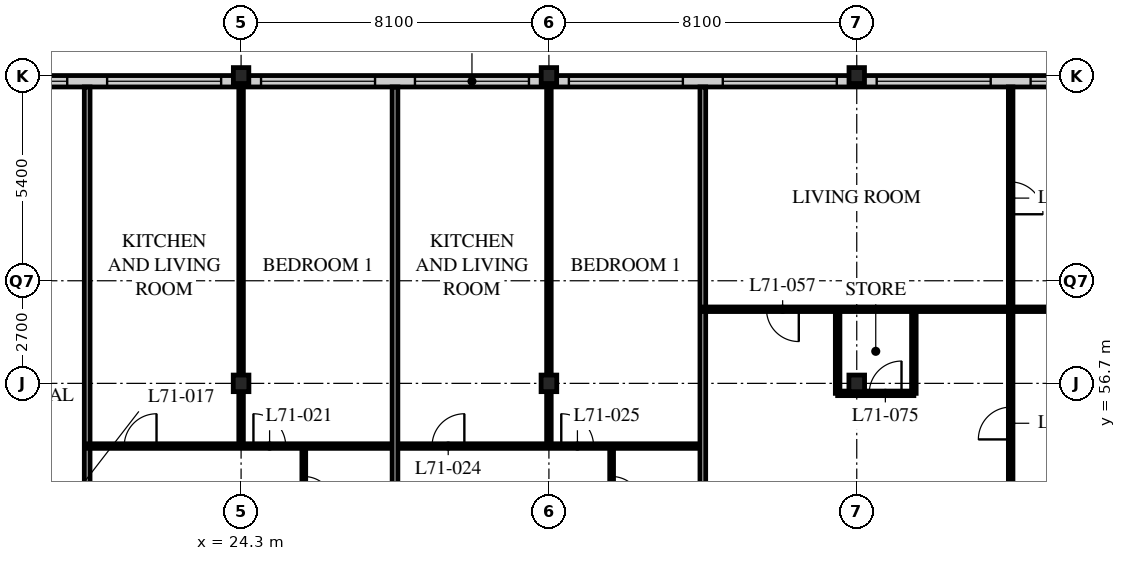
"""IFC4 building model, lengths in metres.
Left out: names, types, materials, properties, quantities, classifications, styles, units other than length and angle.
Written with IfcOpenShell. Run it as: python <this file> out.ifc"""

import sys

from ifc_helpers import new_model, si_unit, direction, frame, frame_2d, origin, origin_2d, place, context, subcontext, project, spatial, rectangle, i_section, extrude, element, fill, save


model = new_model("IFC4")
c1 = context("Model", 3, precision=1e-05, world=origin(), true_north=direction((0.0, 1.0)))
c2 = subcontext(c1, "Body", "Model", "MODEL_VIEW")
j1 = project(units=[si_unit("LENGTHUNIT", "METRE"), si_unit("PLANEANGLEUNIT", "RADIAN")], contexts=[c1])
p1 = place(None, origin())
s1 = spatial("IfcSite", under=j1, at=p1, CompositionType="ELEMENT")
p2 = place(p1, origin())
s2 = spatial("IfcBuilding", under=s1, at=p2, CompositionType="ELEMENT")
p3 = place(p2, frame((0.0, 0.0, 277.5)))
s3 = spatial("IfcBuildingStorey", under=s2, at=p3, CompositionType="ELEMENT", Elevation=277.5)
p4 = place(p3, frame((24.3, 56.7, 0.0), z_axis=(0.0, 0.0, 1.0), x_axis=(1.0, 0.0, 0.0)))
e1 = element("IfcColumn", 1, at=p4, inside=s3, PredefinedType="COLUMN", context=c2, shape_type="SweptSolid", body=[
    extrude(i_section(OverallWidth=0.412, OverallDepth=0.437, WebThickness=0.036, FlangeThickness=0.058, FilletRadius=0.015, at=origin_2d()), origin(), (0.0, 0.0, 1.0), 3.9),
])
p5 = place(p3, frame((24.3, 64.8, 0.0), z_axis=(0.0, 0.0, 1.0), x_axis=(1.0, 0.0, 0.0)))
e2 = element("IfcColumn", 2, at=p5, inside=s3, PredefinedType="COLUMN", context=c2, shape_type="SweptSolid", body=[
    extrude(i_section(OverallWidth=0.407, OverallDepth=0.419, WebThickness=0.031, FlangeThickness=0.049, FilletRadius=0.015, at=origin_2d()), origin(), (0.0, 0.0, 1.0), 3.9),
])
p6 = place(p3, frame((32.4, 56.7, 0.0), z_axis=(0.0, 0.0, 1.0), x_axis=(1.0, 0.0, 0.0)))
e3 = element("IfcColumn", 3, at=p6, inside=s3, PredefinedType="COLUMN", context=c2, shape_type="SweptSolid", body=[
    extrude(i_section(OverallWidth=0.412, OverallDepth=0.437, WebThickness=0.036, FlangeThickness=0.058, FilletRadius=0.015, at=origin_2d()), origin(), (0.0, 0.0, 1.0), 3.9),
])
p7 = place(p3, frame((32.4, 64.8, 0.0), z_axis=(0.0, 0.0, 1.0), x_axis=(1.0, 0.0, 0.0)))
e4 = element("IfcColumn", 4, at=p7, inside=s3, PredefinedType="COLUMN", context=c2, shape_type="SweptSolid", body=[
    extrude(i_section(OverallWidth=0.407, OverallDepth=0.419, WebThickness=0.031, FlangeThickness=0.049, FilletRadius=0.015, at=origin_2d()), origin(), (0.0, 0.0, 1.0), 3.9),
])
p8 = place(p3, frame((40.5, 56.7, 0.0), z_axis=(0.0, 0.0, 1.0), x_axis=(1.0, 0.0, 0.0)))
e5 = element("IfcColumn", 5, at=p8, inside=s3, PredefinedType="COLUMN", context=c2, shape_type="SweptSolid", body=[
    extrude(i_section(OverallWidth=0.412, OverallDepth=0.437, WebThickness=0.036, FlangeThickness=0.058, FilletRadius=0.015, at=origin_2d()), origin(), (0.0, 0.0, 1.0), 3.9),
])
p9 = place(p3, frame((40.5, 64.8, 0.0), z_axis=(0.0, 0.0, 1.0), x_axis=(1.0, 0.0, 0.0)))
e6 = element("IfcColumn", 6, at=p9, inside=s3, PredefinedType="COLUMN", context=c2, shape_type="SweptSolid", body=[
    extrude(i_section(OverallWidth=0.407, OverallDepth=0.419, WebThickness=0.031, FlangeThickness=0.049, FilletRadius=0.015, at=origin_2d()), origin(), (0.0, 0.0, 1.0), 3.9),
])
p10 = place(p3, frame((48.3, 64.65, 0.0), z_axis=(0.0, 0.0, 1.0), x_axis=(-1.0, 0.0, 0.0)))
e7 = element("IfcWall", 7, at=p10, inside=s3, PredefinedType="SOLIDWALL", context=c2, shape_type="SweptSolid", body=[
    extrude(rectangle(XDim=40.2, YDim=0.3, at=frame_2d((20.1, 0.0))), origin(), (0.0, 0.0, 1.0), 3.69),
])
p11 = place(p10, frame((0.225, 0.0, 0.6)))
e8 = element("IfcOpeningElement", 8, at=p11, cuts=e7, PredefinedType="OPENING", context=c2, shape_type="SweptSolid", body=[
    extrude(rectangle(XDim=3.0, YDim=2.4, at=frame_2d((1.5, 1.2))), frame((0.0, 0.16, 0.0), z_axis=(0.0, -1.0, 0.0), x_axis=(1.0, 0.0, 0.0)), (0.0, 0.0, 1.0), 0.32),
])
p12 = place(p10, frame((4.275, 0.0, 0.6)))
e9 = element("IfcOpeningElement", 9, at=p12, cuts=e7, PredefinedType="OPENING", context=c2, shape_type="SweptSolid", body=[
    extrude(rectangle(XDim=3.0, YDim=2.4, at=frame_2d((1.5, 1.2))), frame((0.0, 0.16, 0.0), z_axis=(0.0, -1.0, 0.0), x_axis=(1.0, 0.0, 0.0)), (0.0, 0.0, 1.0), 0.32),
])
p13 = place(p10, frame((8.325, 0.0, 0.6)))
e10 = element("IfcOpeningElement", 10, at=p13, cuts=e7, PredefinedType="OPENING", context=c2, shape_type="SweptSolid", body=[
    extrude(rectangle(XDim=3.0, YDim=2.4, at=frame_2d((1.5, 1.2))), frame((0.0, 0.16, 0.0), z_axis=(0.0, -1.0, 0.0), x_axis=(1.0, 0.0, 0.0)), (0.0, 0.0, 1.0), 0.32),
])
p14 = place(p10, frame((12.375, 0.0, 0.6)))
e11 = element("IfcOpeningElement", 11, at=p14, cuts=e7, PredefinedType="OPENING", context=c2, shape_type="SweptSolid", body=[
    extrude(rectangle(XDim=3.0, YDim=2.4, at=frame_2d((1.5, 1.2))), frame((0.0, 0.16, 0.0), z_axis=(0.0, -1.0, 0.0), x_axis=(1.0, 0.0, 0.0)), (0.0, 0.0, 1.0), 0.32),
])
p15 = place(p10, frame((16.425, 0.0, 0.6)))
e12 = element("IfcOpeningElement", 12, at=p15, cuts=e7, PredefinedType="OPENING", context=c2, shape_type="SweptSolid", body=[
    extrude(rectangle(XDim=3.0, YDim=2.4, at=frame_2d((1.5, 1.2))), frame((0.0, 0.16, 0.0), z_axis=(0.0, -1.0, 0.0), x_axis=(1.0, 0.0, 0.0)), (0.0, 0.0, 1.0), 0.32),
])
p16 = place(p10, frame((20.475, 0.0, 0.6)))
e13 = element("IfcOpeningElement", 13, at=p16, cuts=e7, PredefinedType="OPENING", context=c2, shape_type="SweptSolid", body=[
    extrude(rectangle(XDim=3.0, YDim=2.4, at=frame_2d((1.5, 1.2))), frame((0.0, 0.16, 0.0), z_axis=(0.0, -1.0, 0.0), x_axis=(1.0, 0.0, 0.0)), (0.0, 0.0, 1.0), 0.32),
])
p17 = place(p10, frame((24.525, 0.0, 0.6)))
e14 = element("IfcOpeningElement", 14, at=p17, cuts=e7, PredefinedType="OPENING", context=c2, shape_type="SweptSolid", body=[
    extrude(rectangle(XDim=3.0, YDim=2.4, at=frame_2d((1.5, 1.2))), frame((0.0, 0.16, 0.0), z_axis=(0.0, -1.0, 0.0), x_axis=(1.0, 0.0, 0.0)), (0.0, 0.0, 1.0), 0.32),
])
p18 = place(p10, frame((28.575, 0.0, 0.6)))
e15 = element("IfcOpeningElement", 15, at=p18, cuts=e7, PredefinedType="OPENING", context=c2, shape_type="SweptSolid", body=[
    extrude(rectangle(XDim=3.0, YDim=2.4, at=frame_2d((1.5, 1.2))), frame((0.0, 0.16, 0.0), z_axis=(0.0, -1.0, 0.0), x_axis=(1.0, 0.0, 0.0)), (0.0, 0.0, 1.0), 0.32),
])
p19 = place(p10, frame((32.625, 0.0, 0.6)))
e16 = element("IfcOpeningElement", 16, at=p19, cuts=e7, PredefinedType="OPENING", context=c2, shape_type="SweptSolid", body=[
    extrude(rectangle(XDim=3.0, YDim=2.4, at=frame_2d((1.5, 1.2))), frame((0.0, 0.16, 0.0), z_axis=(0.0, -1.0, 0.0), x_axis=(1.0, 0.0, 0.0)), (0.0, 0.0, 1.0), 0.32),
])
p20 = place(p10, frame((36.675, 0.0, 0.6)))
e17 = element("IfcOpeningElement", 17, at=p20, cuts=e7, PredefinedType="OPENING", context=c2, shape_type="SweptSolid", body=[
    extrude(rectangle(XDim=3.0, YDim=2.4, at=frame_2d((1.5, 1.2))), frame((0.0, 0.16, 0.0), z_axis=(0.0, -1.0, 0.0), x_axis=(1.0, 0.0, 0.0)), (0.0, 0.0, 1.0), 0.32),
])
p21 = place(p3, frame((20.25, 52.65, 0.0), z_axis=(0.0, 0.0, 1.0), x_axis=(0.0, 1.0, 0.0)))
e18 = element("IfcWall", 18, at=p21, inside=s3, PredefinedType="PARTITIONING", context=c2, shape_type="SweptSolid", body=[
    extrude(rectangle(XDim=11.85, YDim=0.15, at=frame_2d((5.925, 0.0))), origin(), (0.0, 0.0, 1.0), 3.69),
])
p22 = place(p3, frame((20.25, 55.05, 0.0), z_axis=(0.0, 0.0, 1.0), x_axis=(1.0, 0.0, 0.0)))
e19 = element("IfcWall", 19, at=p22, inside=s3, PredefinedType="PARTITIONING", context=c2, shape_type="SweptSolid", body=[
    extrude(rectangle(XDim=16.2, YDim=0.12, at=frame_2d((8.1, 0.0))), origin(), (0.0, 0.0, 1.0), 3.69),
])
p23 = place(p22, frame((0.975, 0.0, 0.0)))
e20 = element("IfcOpeningElement", 20, at=p23, cuts=e19, PredefinedType="OPENING", context=c2, shape_type="SweptSolid", body=[
    extrude(rectangle(XDim=0.85, YDim=2.1, at=frame_2d((0.425, 1.05))), frame((0.0, 0.07, 0.0), z_axis=(0.0, -1.0, 0.0), x_axis=(1.0, 0.0, 0.0)), (0.0, 0.0, 1.0), 0.14),
])
p24 = place(p22, frame((4.375, 0.0, 0.0)))
e21 = element("IfcOpeningElement", 21, at=p24, cuts=e19, PredefinedType="OPENING", context=c2, shape_type="SweptSolid", body=[
    extrude(rectangle(XDim=0.85, YDim=2.1, at=frame_2d((0.425, 1.05))), frame((0.0, 0.07, 0.0), z_axis=(0.0, -1.0, 0.0), x_axis=(1.0, 0.0, 0.0)), (0.0, 0.0, 1.0), 0.14),
])
p25 = place(p22, frame((9.075, 0.0, 0.0)))
e22 = element("IfcOpeningElement", 22, at=p25, cuts=e19, PredefinedType="OPENING", context=c2, shape_type="SweptSolid", body=[
    extrude(rectangle(XDim=0.85, YDim=2.1, at=frame_2d((0.425, 1.05))), frame((0.0, 0.07, 0.0), z_axis=(0.0, -1.0, 0.0), x_axis=(1.0, 0.0, 0.0)), (0.0, 0.0, 1.0), 0.14),
])
p26 = place(p22, frame((12.475, 0.0, 0.0)))
e23 = element("IfcOpeningElement", 23, at=p26, cuts=e19, PredefinedType="OPENING", context=c2, shape_type="SweptSolid", body=[
    extrude(rectangle(XDim=0.85, YDim=2.1, at=frame_2d((0.425, 1.05))), frame((0.0, 0.07, 0.0), z_axis=(0.0, -1.0, 0.0), x_axis=(1.0, 0.0, 0.0)), (0.0, 0.0, 1.0), 0.14),
])
p27 = place(p3, frame((25.95, 52.65, 0.0), z_axis=(0.0, 0.0, 1.0), x_axis=(0.0, 1.0, 0.0)))
e24 = element("IfcWall", 24, at=p27, inside=s3, PredefinedType="PARTITIONING", context=c2, shape_type="SweptSolid", body=[
    extrude(rectangle(XDim=2.4, YDim=0.1, at=frame_2d((1.2, 0.0))), origin(), (0.0, 0.0, 1.0), 3.69),
])
p28 = place(p27, frame((0.8, 0.0, 0.0)))
e25 = element("IfcOpeningElement", 25, at=p28, cuts=e24, PredefinedType="OPENING", context=c2, shape_type="SweptSolid", body=[
    extrude(rectangle(XDim=0.8, YDim=2.1, at=frame_2d((0.4, 1.05))), frame((0.0, 0.06, 0.0), z_axis=(0.0, -1.0, 0.0), x_axis=(1.0, 0.0, 0.0)), (0.0, 0.0, 1.0), 0.12),
])
p29 = place(p3, frame((24.3, 55.05, 0.0), z_axis=(0.0, 0.0, 1.0), x_axis=(0.0, 1.0, 0.0)))
e26 = element("IfcWall", 26, at=p29, inside=s3, PredefinedType="PARTITIONING", context=c2, shape_type="SweptSolid", body=[
    extrude(rectangle(XDim=9.45, YDim=0.12, at=frame_2d((4.725, 0.0))), origin(), (0.0, 0.0, 1.0), 3.078),
])
p30 = place(p3, frame((28.35, 52.65, 0.0), z_axis=(0.0, 0.0, 1.0), x_axis=(0.0, 1.0, 0.0)))
e27 = element("IfcWall", 27, at=p30, inside=s3, PredefinedType="PARTITIONING", context=c2, shape_type="SweptSolid", body=[
    extrude(rectangle(XDim=11.85, YDim=0.15, at=frame_2d((5.925, 0.0))), origin(), (0.0, 0.0, 1.0), 3.69),
])
p31 = place(p3, frame((34.05, 52.65, 0.0), z_axis=(0.0, 0.0, 1.0), x_axis=(0.0, 1.0, 0.0)))
e28 = element("IfcWall", 28, at=p31, inside=s3, PredefinedType="PARTITIONING", context=c2, shape_type="SweptSolid", body=[
    extrude(rectangle(XDim=2.4, YDim=0.1, at=frame_2d((1.2, 0.0))), origin(), (0.0, 0.0, 1.0), 3.69),
])
p32 = place(p31, frame((0.8, 0.0, 0.0)))
e29 = element("IfcOpeningElement", 29, at=p32, cuts=e28, PredefinedType="OPENING", context=c2, shape_type="SweptSolid", body=[
    extrude(rectangle(XDim=0.8, YDim=2.1, at=frame_2d((0.4, 1.05))), frame((0.0, 0.06, 0.0), z_axis=(0.0, -1.0, 0.0), x_axis=(1.0, 0.0, 0.0)), (0.0, 0.0, 1.0), 0.12),
])
p33 = place(p3, frame((32.4, 55.05, 0.0), z_axis=(0.0, 0.0, 1.0), x_axis=(0.0, 1.0, 0.0)))
e30 = element("IfcWall", 30, at=p33, inside=s3, PredefinedType="PARTITIONING", context=c2, shape_type="SweptSolid", body=[
    extrude(rectangle(XDim=9.45, YDim=0.12, at=frame_2d((4.725, 0.0))), origin(), (0.0, 0.0, 1.0), 3.078),
])
p34 = place(p3, frame((36.45, 64.5, 0.0), z_axis=(0.0, 0.0, 1.0), x_axis=(0.0, -1.0, 0.0)))
e31 = element("IfcWall", 31, at=p34, inside=s3, PredefinedType="PARTITIONING", context=c2, shape_type="SweptSolid", body=[
    extrude(rectangle(XDim=11.85, YDim=0.15, at=frame_2d((5.925, 0.0))), origin(), (0.0, 0.0, 1.0), 3.69),
])
p35 = place(p3, frame((36.45, 58.65, 0.0), z_axis=(0.0, 0.0, 1.0), x_axis=(1.0, 0.0, 0.0)))
e32 = element("IfcWall", 32, at=p35, inside=s3, PredefinedType="PARTITIONING", context=c2, shape_type="SweptSolid", body=[
    extrude(rectangle(XDim=15.9, YDim=0.12, at=frame_2d((7.95, 0.0))), origin(), (0.0, 0.0, 1.0), 3.69),
])
p36 = place(p35, frame((1.675, 0.0, 0.0)))
e33 = element("IfcOpeningElement", 33, at=p36, cuts=e32, PredefinedType="OPENING", context=c2, shape_type="SweptSolid", body=[
    extrude(rectangle(XDim=0.85, YDim=2.1, at=frame_2d((0.425, 1.05))), frame((0.0, 0.07, 0.0), z_axis=(0.0, -1.0, 0.0), x_axis=(1.0, 0.0, 0.0)), (0.0, 0.0, 1.0), 0.14),
])
p37 = place(p3, frame((44.55, 64.5, 0.0), z_axis=(0.0, 0.0, 1.0), x_axis=(0.0, -1.0, 0.0)))
e34 = element("IfcWall", 34, at=p37, inside=s3, PredefinedType="PARTITIONING", context=c2, shape_type="SweptSolid", body=[
    extrude(rectangle(XDim=13.65, YDim=0.12, at=frame_2d((6.825, 0.0))), origin(), (0.0, 0.0, 1.0), 3.69),
])
p38 = place(p37, frame((8.425, 0.0, 0.0)))
e35 = element("IfcOpeningElement", 35, at=p38, cuts=e34, PredefinedType="OPENING", context=c2, shape_type="SweptSolid", body=[
    extrude(rectangle(XDim=0.85, YDim=2.1, at=frame_2d((0.425, 1.05))), frame((0.0, 0.07, 0.0), z_axis=(0.0, -1.0, 0.0), x_axis=(1.0, 0.0, 0.0)), (0.0, 0.0, 1.0), 0.14),
])
p39 = place(p37, frame((2.5, 0.0, 0.0)))
e36 = element("IfcOpeningElement", 36, at=p39, cuts=e34, PredefinedType="OPENING", context=c2, shape_type="SweptSolid", body=[
    extrude(rectangle(XDim=0.85, YDim=2.1, at=frame_2d((0.425, 1.05))), frame((0.0, 0.07, 0.0), z_axis=(0.0, -1.0, 0.0), x_axis=(1.0, 0.0, 0.0)), (0.0, 0.0, 1.0), 0.14),
])
for number, where, z_axis, x_axis in (
    (37, (39.997, 58.65, 0.0), (0.0, 0.0, 1.0), (0.0, -1.0, 0.0)),
    (38, (42.003, 58.65, 0.0), (0.0, 0.0, 1.0), (0.0, -1.0, 0.0)),
):
    element("IfcWall", number, at=place(p3, frame(where, z_axis=z_axis, x_axis=x_axis)), inside=s3, PredefinedType="PARTITIONING", context=c2, shape_type="SweptSolid", body=[
        extrude(rectangle(XDim=2.213, YDim=0.12, at=frame_2d((1.106, 0.0))), origin(), (0.0, 0.0, 1.0), 3.69),
    ])
p40 = place(p3, frame((39.997, 56.437, 0.0), z_axis=(0.0, 0.0, 1.0), x_axis=(1.0, 0.0, 0.0)))
e39 = element("IfcWall", 39, at=p40, inside=s3, PredefinedType="PARTITIONING", context=c2, shape_type="SweptSolid", body=[
    extrude(rectangle(XDim=2.006, YDim=0.12, at=frame_2d((1.003, 0.0))), origin(), (0.0, 0.0, 1.0), 3.69),
])
p41 = place(p40, frame((0.831, 0.0, 0.0)))
e40 = element("IfcOpeningElement", 40, at=p41, cuts=e39, PredefinedType="OPENING", context=c2, shape_type="SweptSolid", body=[
    extrude(rectangle(XDim=0.85, YDim=2.1, at=frame_2d((0.425, 1.05))), frame((0.0, 0.07, 0.0), z_axis=(0.0, -1.0, 0.0), x_axis=(1.0, 0.0, 0.0)), (0.0, 0.0, 1.0), 0.14),
])
p42 = place(p11, origin())
e41 = element("IfcWindow", 41, at=p42, inside=s3, PartitioningType="SINGLE_PANEL", PredefinedType="WINDOW", context=c2, shape_type="SweptSolid", body=[
    extrude(rectangle(XDim=3.0, YDim=2.4, at=frame_2d((1.5, 1.2))), frame((0.0, 0.03, 0.0), z_axis=(0.0, -1.0, 0.0), x_axis=(1.0, 0.0, 0.0)), (0.0, 0.0, 1.0), 0.06),
])
fill(e8, e41)
p43 = place(p12, origin())
e42 = element("IfcWindow", 42, at=p43, inside=s3, PartitioningType="SINGLE_PANEL", PredefinedType="WINDOW", context=c2, shape_type="SweptSolid", body=[
    extrude(rectangle(XDim=3.0, YDim=2.4, at=frame_2d((1.5, 1.2))), frame((0.0, 0.03, 0.0), z_axis=(0.0, -1.0, 0.0), x_axis=(1.0, 0.0, 0.0)), (0.0, 0.0, 1.0), 0.06),
])
fill(e9, e42)
p44 = place(p13, origin())
e43 = element("IfcWindow", 43, at=p44, inside=s3, PartitioningType="SINGLE_PANEL", PredefinedType="WINDOW", context=c2, shape_type="SweptSolid", body=[
    extrude(rectangle(XDim=3.0, YDim=2.4, at=frame_2d((1.5, 1.2))), frame((0.0, 0.03, 0.0), z_axis=(0.0, -1.0, 0.0), x_axis=(1.0, 0.0, 0.0)), (0.0, 0.0, 1.0), 0.06),
])
fill(e10, e43)
p45 = place(p14, origin())
e44 = element("IfcWindow", 44, at=p45, inside=s3, PartitioningType="SINGLE_PANEL", PredefinedType="WINDOW", context=c2, shape_type="SweptSolid", body=[
    extrude(rectangle(XDim=3.0, YDim=2.4, at=frame_2d((1.5, 1.2))), frame((0.0, 0.03, 0.0), z_axis=(0.0, -1.0, 0.0), x_axis=(1.0, 0.0, 0.0)), (0.0, 0.0, 1.0), 0.06),
])
fill(e11, e44)
p46 = place(p15, origin())
e45 = element("IfcWindow", 45, at=p46, inside=s3, PartitioningType="SINGLE_PANEL", PredefinedType="WINDOW", context=c2, shape_type="SweptSolid", body=[
    extrude(rectangle(XDim=3.0, YDim=2.4, at=frame_2d((1.5, 1.2))), frame((0.0, 0.03, 0.0), z_axis=(0.0, -1.0, 0.0), x_axis=(1.0, 0.0, 0.0)), (0.0, 0.0, 1.0), 0.06),
])
fill(e12, e45)
p47 = place(p16, origin())
e46 = element("IfcWindow", 46, at=p47, inside=s3, PartitioningType="SINGLE_PANEL", PredefinedType="WINDOW", context=c2, shape_type="SweptSolid", body=[
    extrude(rectangle(XDim=3.0, YDim=2.4, at=frame_2d((1.5, 1.2))), frame((0.0, 0.03, 0.0), z_axis=(0.0, -1.0, 0.0), x_axis=(1.0, 0.0, 0.0)), (0.0, 0.0, 1.0), 0.06),
])
fill(e13, e46)
p48 = place(p17, origin())
e47 = element("IfcWindow", 47, at=p48, inside=s3, PartitioningType="SINGLE_PANEL", PredefinedType="WINDOW", context=c2, shape_type="SweptSolid", body=[
    extrude(rectangle(XDim=3.0, YDim=2.4, at=frame_2d((1.5, 1.2))), frame((0.0, 0.03, 0.0), z_axis=(0.0, -1.0, 0.0), x_axis=(1.0, 0.0, 0.0)), (0.0, 0.0, 1.0), 0.06),
])
fill(e14, e47)
p49 = place(p18, origin())
e48 = element("IfcWindow", 48, at=p49, inside=s3, PartitioningType="SINGLE_PANEL", PredefinedType="WINDOW", context=c2, shape_type="SweptSolid", body=[
    extrude(rectangle(XDim=3.0, YDim=2.4, at=frame_2d((1.5, 1.2))), frame((0.0, 0.03, 0.0), z_axis=(0.0, -1.0, 0.0), x_axis=(1.0, 0.0, 0.0)), (0.0, 0.0, 1.0), 0.06),
])
fill(e15, e48)
p50 = place(p28, origin())
e49 = element("IfcDoor", 49, at=p50, inside=s3, OperationType="SINGLE_SWING_RIGHT", PredefinedType="DOOR", context=c2, shape_type="SweptSolid", body=[
    extrude(rectangle(XDim=0.8, YDim=2.1, at=frame_2d((0.4, 1.05))), frame((0.0, 0.025, 0.0), z_axis=(0.0, -1.0, 0.0), x_axis=(1.0, 0.0, 0.0)), (0.0, 0.0, 1.0), 0.05),
])
fill(e25, e49)
p51 = place(p23, origin())
e50 = element("IfcDoor", 50, at=p51, inside=s3, OperationType="SINGLE_SWING_RIGHT", PredefinedType="DOOR", context=c2, shape_type="SweptSolid", body=[
    extrude(rectangle(XDim=0.85, YDim=2.1, at=frame_2d((0.425, 1.05))), frame((0.0, 0.025, 0.0), z_axis=(0.0, -1.0, 0.0), x_axis=(1.0, 0.0, 0.0)), (0.0, 0.0, 1.0), 0.05),
])
fill(e20, e50)
p52 = place(p24, origin())
e51 = element("IfcDoor", 51, at=p52, inside=s3, OperationType="SINGLE_SWING_LEFT", PredefinedType="DOOR", context=c2, shape_type="SweptSolid", body=[
    extrude(rectangle(XDim=0.85, YDim=2.1, at=frame_2d((0.425, 1.05))), frame((0.0, 0.025, 0.0), z_axis=(0.0, -1.0, 0.0), x_axis=(1.0, 0.0, 0.0)), (0.0, 0.0, 1.0), 0.05),
])
fill(e21, e51)
p53 = place(p32, origin())
e52 = element("IfcDoor", 52, at=p53, inside=s3, OperationType="SINGLE_SWING_RIGHT", PredefinedType="DOOR", context=c2, shape_type="SweptSolid", body=[
    extrude(rectangle(XDim=0.8, YDim=2.1, at=frame_2d((0.4, 1.05))), frame((0.0, 0.025, 0.0), z_axis=(0.0, -1.0, 0.0), x_axis=(1.0, 0.0, 0.0)), (0.0, 0.0, 1.0), 0.05),
])
fill(e29, e52)
p54 = place(p25, origin())
e53 = element("IfcDoor", 53, at=p54, inside=s3, OperationType="SINGLE_SWING_RIGHT", PredefinedType="DOOR", context=c2, shape_type="SweptSolid", body=[
    extrude(rectangle(XDim=0.85, YDim=2.1, at=frame_2d((0.425, 1.05))), frame((0.0, 0.025, 0.0), z_axis=(0.0, -1.0, 0.0), x_axis=(1.0, 0.0, 0.0)), (0.0, 0.0, 1.0), 0.05),
])
fill(e22, e53)
p55 = place(p26, origin())
e54 = element("IfcDoor", 54, at=p55, inside=s3, OperationType="SINGLE_SWING_LEFT", PredefinedType="DOOR", context=c2, shape_type="SweptSolid", body=[
    extrude(rectangle(XDim=0.85, YDim=2.1, at=frame_2d((0.425, 1.05))), frame((0.0, 0.025, 0.0), z_axis=(0.0, -1.0, 0.0), x_axis=(1.0, 0.0, 0.0)), (0.0, 0.0, 1.0), 0.05),
])
fill(e23, e54)
p56 = place(p36, origin())
e55 = element("IfcDoor", 55, at=p56, inside=s3, OperationType="SINGLE_SWING_LEFT", PredefinedType="DOOR", context=c2, shape_type="SweptSolid", body=[
    extrude(rectangle(XDim=0.85, YDim=2.1, at=frame_2d((0.425, 1.05))), frame((0.0, 0.025, 0.0), z_axis=(0.0, -1.0, 0.0), x_axis=(1.0, 0.0, 0.0)), (0.0, 0.0, 1.0), 0.05),
])
fill(e33, e55)
p57 = place(p38, origin())
e56 = element("IfcDoor", 56, at=p57, inside=s3, OperationType="SINGLE_SWING_LEFT", PredefinedType="DOOR", context=c2, shape_type="SweptSolid", body=[
    extrude(rectangle(XDim=0.85, YDim=2.1, at=frame_2d((0.425, 1.05))), frame((0.0, 0.025, 0.0), z_axis=(0.0, -1.0, 0.0), x_axis=(1.0, 0.0, 0.0)), (0.0, 0.0, 1.0), 0.05),
])
fill(e35, e56)
p58 = place(p39, origin())
e57 = element("IfcDoor", 57, at=p58, inside=s3, OperationType="SINGLE_SWING_RIGHT", PredefinedType="DOOR", context=c2, shape_type="SweptSolid", body=[
    extrude(rectangle(XDim=0.85, YDim=2.1, at=frame_2d((0.425, 1.05))), frame((0.0, 0.025, 0.0), z_axis=(0.0, -1.0, 0.0), x_axis=(1.0, 0.0, 0.0)), (0.0, 0.0, 1.0), 0.05),
])
fill(e36, e57)
p59 = place(p41, origin())
e58 = element("IfcDoor", 58, at=p59, inside=s3, OperationType="SINGLE_SWING_RIGHT", PredefinedType="DOOR", context=c2, shape_type="SweptSolid", body=[
    extrude(rectangle(XDim=0.85, YDim=2.1, at=frame_2d((0.425, 1.05))), frame((0.0, 0.025, 0.0), z_axis=(0.0, -1.0, 0.0), x_axis=(1.0, 0.0, 0.0)), (0.0, 0.0, 1.0), 0.05),
])
fill(e40, e58)
save(model, sys.argv[1])
